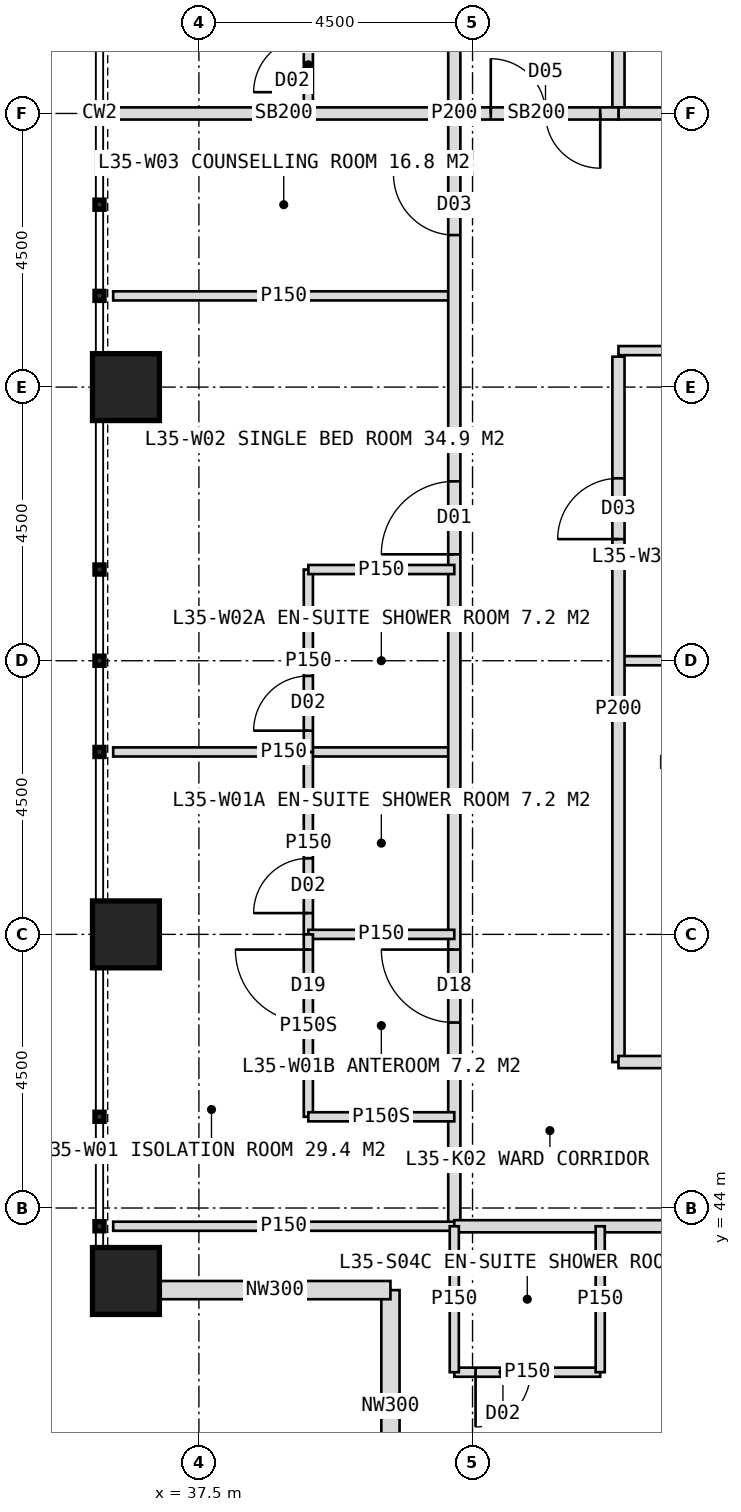
"""IFC4 building model, lengths in metres.
Left out: names, types, materials, properties, quantities, classifications, styles, units other than length and angle.
Written with IfcOpenShell. Run it as: python <this file> out.ifc"""

import sys

from ifc_helpers import new_model, si_unit, direction, frame, frame_2d, origin, origin_2d, place, context, subcontext, project, spatial, rectangle, hollow_rectangle, extrude, element, fill, save


model = new_model("IFC4")
c1 = context("Model", 3, precision=1e-05, world=origin(), true_north=direction((0.0, 1.0)))
c2 = subcontext(c1, "Body", "Model", "MODEL_VIEW")
j1 = project(units=[si_unit("LENGTHUNIT", "METRE"), si_unit("PLANEANGLEUNIT", "RADIAN")], contexts=[c1])
p1 = place(None, origin())
s1 = spatial("IfcSite", under=j1, at=p1, CompositionType="ELEMENT")
p2 = place(p1, origin())
s2 = spatial("IfcBuilding", under=s1, at=p2, CompositionType="ELEMENT")
p3 = place(p2, frame((0.0, 0.0, 148.0)))
s3 = spatial("IfcBuildingStorey", under=s2, at=p3, CompositionType="ELEMENT", Elevation=148.0)
for number, where, z_axis, x_axis in (
    (1, (36.3, 42.8, 0.0), (0.0, 0.0, 1.0), (1.0, 0.0, 0.0)),
    (2, (36.3, 48.5, 0.0), (0.0, 0.0, 1.0), (1.0, 0.0, 0.0)),
    (3, (36.3, 57.5, 0.0), (0.0, 0.0, 1.0), (1.0, 0.0, 0.0)),
):
    element("IfcColumn", number, at=place(p3, frame(where, z_axis=z_axis, x_axis=x_axis)), inside=s3, PredefinedType="COLUMN", context=c2, shape_type="SweptSolid", body=[
        extrude(hollow_rectangle(XDim=1.1, YDim=1.1, WallThickness=0.1, at=origin_2d()), origin(), (0.0, 0.0, 1.0), 4.0),
    ])
for number, where, z_axis, x_axis in (
    (4, (40.65, 38.85, 0.0), (0.0, 0.0, 1.0), (0.0, 1.0, 0.0)),
    (5, (40.65, 42.65, 0.0), (0.0, 0.0, 1.0), (-1.0, 0.0, 0.0)),
):
    element("IfcWall", number, at=place(p3, frame(where, z_axis=z_axis, x_axis=x_axis)), inside=s3, PredefinedType="ELEMENTEDWALL", context=c2, shape_type="SweptSolid", body=[
        extrude(rectangle(XDim=3.8, YDim=0.3, at=frame_2d((1.9, 0.0))), origin(), (0.0, 0.0, 1.0), 4.0),
    ])
for number, where, z_axis, x_axis in (
    (6, (41.7, 51.5, 0.0), (0.0, 0.0, 1.0), (-1.0, 0.0, 0.0)),
    (7, (41.7, 59.0, 0.0), (0.0, 0.0, 1.0), (-1.0, 0.0, 0.0)),
):
    element("IfcWall", number, at=place(p3, frame(where, z_axis=z_axis, x_axis=x_axis)), inside=s3, PredefinedType="PARTITIONING", context=c2, shape_type="SweptSolid", body=[
        extrude(rectangle(XDim=5.61, YDim=0.15, at=frame_2d((2.805, 0.0))), origin(), (0.0, 0.0, 1.0), 3.75),
    ])
p4 = place(p3, frame((41.7, 62.0, 0.0), z_axis=(0.0, 0.0, 1.0), x_axis=(-1.0, 0.0, 0.0)))
e8 = element("IfcWall", 8, at=p4, inside=s3, PredefinedType="SOLIDWALL", context=c2, shape_type="SweptSolid", body=[
    extrude(rectangle(XDim=5.61, YDim=0.2, at=frame_2d((2.805, 0.0))), origin(), (0.0, 0.0, 1.0), 2.95),
])
p5 = place(p3, frame((41.7, 43.7, 0.0), z_axis=(0.0, 0.0, 1.0), x_axis=(0.0, 1.0, 0.0)))
e9 = element("IfcWall", 9, at=p5, inside=s3, PredefinedType="PARTITIONING", context=c2, shape_type="SweptSolid", body=[
    extrude(rectangle(XDim=36.6, YDim=0.2, at=frame_2d((18.3, 0.0))), origin(), (0.0, 0.0, 1.0), 3.75),
])
p6 = place(p5, frame((3.35, 0.0, 0.0)))
e10 = element("IfcOpeningElement", 10, at=p6, cuts=e9, PredefinedType="OPENING", context=c2, shape_type="SweptSolid", body=[
    extrude(rectangle(XDim=1.2, YDim=2.2, at=frame_2d((0.6, 1.1))), frame((0.0, 0.11, 0.0), z_axis=(0.0, -1.0, 0.0), x_axis=(1.0, 0.0, 0.0)), (0.0, 0.0, 1.0), 0.22),
])
p7 = place(p5, frame((11.05, 0.0, 0.0)))
e11 = element("IfcOpeningElement", 11, at=p7, cuts=e9, PredefinedType="OPENING", context=c2, shape_type="SweptSolid", body=[
    extrude(rectangle(XDim=1.2, YDim=2.2, at=frame_2d((0.6, 1.1))), frame((0.0, 0.11, 0.0), z_axis=(0.0, -1.0, 0.0), x_axis=(1.0, 0.0, 0.0)), (0.0, 0.0, 1.0), 0.22),
])
p8 = place(p5, frame((16.3, 0.0, 0.0)))
e12 = element("IfcOpeningElement", 12, at=p8, cuts=e9, PredefinedType="OPENING", context=c2, shape_type="SweptSolid", body=[
    extrude(rectangle(XDim=1.0, YDim=2.1, at=frame_2d((0.5, 1.05))), frame((0.0, 0.11, 0.0), z_axis=(0.0, -1.0, 0.0), x_axis=(1.0, 0.0, 0.0)), (0.0, 0.0, 1.0), 0.22),
])
p9 = place(p5, frame((20.95, 0.0, 0.0)))
e13 = element("IfcOpeningElement", 13, at=p9, cuts=e9, PredefinedType="OPENING", context=c2, shape_type="SweptSolid", body=[
    extrude(rectangle(XDim=1.2, YDim=2.2, at=frame_2d((0.6, 1.1))), frame((0.0, 0.11, 0.0), z_axis=(0.0, -1.0, 0.0), x_axis=(1.0, 0.0, 0.0)), (0.0, 0.0, 1.0), 0.22),
])
p10 = place(p5, frame((32.75, 0.0, 0.0)))
e14 = element("IfcOpeningElement", 14, at=p10, cuts=e9, PredefinedType="OPENING", context=c2, shape_type="SweptSolid", body=[
    extrude(rectangle(XDim=1.2, YDim=2.2, at=frame_2d((0.6, 1.1))), frame((0.0, 0.11, 0.0), z_axis=(0.0, -1.0, 0.0), x_axis=(1.0, 0.0, 0.0)), (0.0, 0.0, 1.0), 0.22),
])
p11 = place(p3, frame((41.7, 43.7, 0.0), z_axis=(0.0, 0.0, 1.0), x_axis=(-1.0, 0.0, 0.0)))
e15 = element("IfcWall", 15, at=p11, inside=s3, PredefinedType="PARTITIONING", context=c2, shape_type="SweptSolid", body=[
    extrude(rectangle(XDim=5.61, YDim=0.15, at=frame_2d((2.805, 0.0))), origin(), (0.0, 0.0, 1.0), 3.75),
])
p12 = place(p3, frame((39.3, 48.5, 0.0), z_axis=(0.0, 0.0, 1.0), x_axis=(0.0, 1.0, 0.0)))
e16 = element("IfcWall", 16, at=p12, inside=s3, PredefinedType="PARTITIONING", context=c2, shape_type="SweptSolid", body=[
    extrude(rectangle(XDim=3.0, YDim=0.15, at=frame_2d((1.5, 0.0))), origin(), (0.0, 0.0, 1.0), 3.75),
])
p13 = place(p12, frame((0.35, 0.0, 0.0)))
e17 = element("IfcOpeningElement", 17, at=p13, cuts=e16, PredefinedType="OPENING", context=c2, shape_type="SweptSolid", body=[
    extrude(rectangle(XDim=0.9, YDim=2.1, at=frame_2d((0.45, 1.05))), frame((0.0, 0.085, 0.0), z_axis=(0.0, -1.0, 0.0), x_axis=(1.0, 0.0, 0.0)), (0.0, 0.0, 1.0), 0.17),
])
p14 = place(p3, frame((41.7, 48.5, 0.0), z_axis=(0.0, 0.0, 1.0), x_axis=(-1.0, 0.0, 0.0)))
e18 = element("IfcWall", 18, at=p14, inside=s3, PredefinedType="PARTITIONING", context=c2, shape_type="SweptSolid", body=[
    extrude(rectangle(XDim=2.4, YDim=0.15, at=frame_2d((1.2, 0.0))), origin(), (0.0, 0.0, 1.0), 2.95),
])
p15 = place(p3, frame((39.3, 45.5, 0.0), z_axis=(0.0, 0.0, 1.0), x_axis=(0.0, 1.0, 0.0)))
e19 = element("IfcWall", 19, at=p15, inside=s3, PredefinedType="PARTITIONING", context=c2, shape_type="SweptSolid", body=[
    extrude(rectangle(XDim=3.0, YDim=0.15, at=frame_2d((1.5, 0.0))), origin(), (0.0, 0.0, 1.0), 3.75),
])
p16 = place(p15, frame((1.55, 0.0, 0.0)))
e20 = element("IfcOpeningElement", 20, at=p16, cuts=e19, PredefinedType="OPENING", context=c2, shape_type="SweptSolid", body=[
    extrude(rectangle(XDim=1.2, YDim=2.2, at=frame_2d((0.6, 1.1))), frame((0.0, 0.085, 0.0), z_axis=(0.0, -1.0, 0.0), x_axis=(1.0, 0.0, 0.0)), (0.0, 0.0, 1.0), 0.17),
])
p17 = place(p3, frame((41.7, 45.5, 0.0), z_axis=(0.0, 0.0, 1.0), x_axis=(-1.0, 0.0, 0.0)))
e21 = element("IfcWall", 21, at=p17, inside=s3, PredefinedType="PARTITIONING", context=c2, shape_type="SweptSolid", body=[
    extrude(rectangle(XDim=2.4, YDim=0.15, at=frame_2d((1.2, 0.0))), origin(), (0.0, 0.0, 1.0), 3.75),
])
p18 = place(p3, frame((39.3, 51.5, 0.0), z_axis=(0.0, 0.0, 1.0), x_axis=(0.0, 1.0, 0.0)))
e22 = element("IfcWall", 22, at=p18, inside=s3, PredefinedType="PARTITIONING", context=c2, shape_type="SweptSolid", body=[
    extrude(rectangle(XDim=3.0, YDim=0.15, at=frame_2d((1.5, 0.0))), origin(), (0.0, 0.0, 1.0), 3.75),
])
p19 = place(p18, frame((0.35, 0.0, 0.0)))
e23 = element("IfcOpeningElement", 23, at=p19, cuts=e22, PredefinedType="OPENING", context=c2, shape_type="SweptSolid", body=[
    extrude(rectangle(XDim=0.9, YDim=2.1, at=frame_2d((0.45, 1.05))), frame((0.0, 0.085, 0.0), z_axis=(0.0, -1.0, 0.0), x_axis=(1.0, 0.0, 0.0)), (0.0, 0.0, 1.0), 0.17),
])
p20 = place(p3, frame((41.7, 54.5, 0.0), z_axis=(0.0, 0.0, 1.0), x_axis=(-1.0, 0.0, 0.0)))
e24 = element("IfcWall", 24, at=p20, inside=s3, PredefinedType="PARTITIONING", context=c2, shape_type="SweptSolid", body=[
    extrude(rectangle(XDim=2.4, YDim=0.15, at=frame_2d((1.2, 0.0))), origin(), (0.0, 0.0, 1.0), 3.75),
])
p21 = place(p3, frame((39.3, 62.0, 0.0), z_axis=(0.0, 0.0, 1.0), x_axis=(0.0, 1.0, 0.0)))
e25 = element("IfcWall", 25, at=p21, inside=s3, PredefinedType="PARTITIONING", context=c2, shape_type="SweptSolid", body=[
    extrude(rectangle(XDim=2.4, YDim=0.15, at=frame_2d((1.2, 0.0))), origin(), (0.0, 0.0, 1.0), 3.75),
])
p22 = place(p21, frame((0.35, 0.0, 0.0)))
e26 = element("IfcOpeningElement", 26, at=p22, cuts=e25, PredefinedType="OPENING", context=c2, shape_type="SweptSolid", body=[
    extrude(rectangle(XDim=0.9, YDim=2.1, at=frame_2d((0.45, 1.05))), frame((0.0, 0.085, 0.0), z_axis=(0.0, -1.0, 0.0), x_axis=(1.0, 0.0, 0.0)), (0.0, 0.0, 1.0), 0.17),
])
p23 = place(p3, frame((51.0, 53.0, 0.0), z_axis=(0.0, 0.0, 1.0), x_axis=(-1.0, 0.0, 0.0)))
e27 = element("IfcWall", 27, at=p23, inside=s3, PredefinedType="PARTITIONING", context=c2, shape_type="SweptSolid", body=[
    extrude(rectangle(XDim=6.6, YDim=0.15, at=frame_2d((3.3, 0.0))), origin(), (0.0, 0.0, 1.0), 3.75),
])
p24 = place(p3, frame((44.4, 46.4, 0.0), z_axis=(0.0, 0.0, 1.0), x_axis=(0.0, 1.0, 0.0)))
e28 = element("IfcWall", 28, at=p24, inside=s3, PredefinedType="PARTITIONING", context=c2, shape_type="SweptSolid", body=[
    extrude(rectangle(XDim=11.6, YDim=0.2, at=frame_2d((5.8, 0.0))), origin(), (0.0, 0.0, 1.0), 3.75),
])
p25 = place(p24, frame((8.6, 0.0, 0.0)))
e29 = element("IfcOpeningElement", 29, at=p25, cuts=e28, PredefinedType="OPENING", context=c2, shape_type="SweptSolid", body=[
    extrude(rectangle(XDim=1.0, YDim=2.1, at=frame_2d((0.5, 1.05))), frame((0.0, 0.11, 0.0), z_axis=(0.0, -1.0, 0.0), x_axis=(1.0, 0.0, 0.0)), (0.0, 0.0, 1.0), 0.22),
])
p26 = place(p3, frame((44.4, 62.0, 0.0), z_axis=(0.0, 0.0, 1.0), x_axis=(0.0, 1.0, 0.0)))
e30 = element("IfcWall", 30, at=p26, inside=s3, PredefinedType="PARTITIONING", context=c2, shape_type="SweptSolid", body=[
    extrude(rectangle(XDim=15.6, YDim=0.2, at=frame_2d((7.8, 0.0))), origin(), (0.0, 0.0, 1.0), 3.75),
])
p27 = place(p26, frame((3.25, 0.0, 0.0)))
e31 = element("IfcOpeningElement", 31, at=p27, cuts=e30, PredefinedType="OPENING", context=c2, shape_type="SweptSolid", body=[
    extrude(rectangle(XDim=1.0, YDim=2.1, at=frame_2d((0.5, 1.05))), frame((0.0, 0.11, 0.0), z_axis=(0.0, -1.0, 0.0), x_axis=(1.0, 0.0, 0.0)), (0.0, 0.0, 1.0), 0.22),
])
p28 = place(p26, frame((9.25, 0.0, 0.0)))
e32 = element("IfcOpeningElement", 32, at=p28, cuts=e30, PredefinedType="OPENING", context=c2, shape_type="SweptSolid", body=[
    extrude(rectangle(XDim=1.0, YDim=2.1, at=frame_2d((0.5, 1.05))), frame((0.0, 0.11, 0.0), z_axis=(0.0, -1.0, 0.0), x_axis=(1.0, 0.0, 0.0)), (0.0, 0.0, 1.0), 0.22),
])
p29 = place(p26, frame((13.3, 0.0, 0.0)))
e33 = element("IfcOpeningElement", 33, at=p29, cuts=e30, PredefinedType="OPENING", context=c2, shape_type="SweptSolid", body=[
    extrude(rectangle(XDim=1.0, YDim=2.1, at=frame_2d((0.5, 1.05))), frame((0.0, 0.11, 0.0), z_axis=(0.0, -1.0, 0.0), x_axis=(1.0, 0.0, 0.0)), (0.0, 0.0, 1.0), 0.22),
])
p30 = place(p3, frame((51.0, 58.1, 0.0), z_axis=(0.0, 0.0, 1.0), x_axis=(-1.0, 0.0, 0.0)))
e34 = element("IfcWall", 34, at=p30, inside=s3, PredefinedType="PARTITIONING", context=c2, shape_type="SweptSolid", body=[
    extrude(rectangle(XDim=6.6, YDim=0.15, at=frame_2d((3.3, 0.0))), origin(), (0.0, 0.0, 1.0), 3.75),
])
p31 = place(p30, frame((0.6, 0.0, 0.0)))
e35 = element("IfcOpeningElement", 35, at=p31, cuts=e34, PredefinedType="OPENING", context=c2, shape_type="SweptSolid", body=[
    extrude(rectangle(XDim=0.9, YDim=2.1, at=frame_2d((0.45, 1.05))), frame((0.0, 0.085, 0.0), z_axis=(0.0, -1.0, 0.0), x_axis=(1.0, 0.0, 0.0)), (0.0, 0.0, 1.0), 0.17),
])
p32 = place(p3, frame((51.0, 62.0, 0.0), z_axis=(0.0, 0.0, 1.0), x_axis=(-1.0, 0.0, 0.0)))
e36 = element("IfcWall", 36, at=p32, inside=s3, PredefinedType="SOLIDWALL", context=c2, shape_type="SweptSolid", body=[
    extrude(rectangle(XDim=6.6, YDim=0.2, at=frame_2d((3.3, 0.0))), origin(), (0.0, 0.0, 1.0), 2.95),
])
p33 = place(p3, frame((78.3, 43.7, 0.0), z_axis=(0.0, 0.0, 1.0), x_axis=(-1.0, 0.0, 0.0)))
e37 = element("IfcWall", 37, at=p33, inside=s3, PredefinedType="PARTITIONING", context=c2, shape_type="SweptSolid", body=[
    extrude(rectangle(XDim=36.6, YDim=0.2, at=frame_2d((18.3, 0.0))), origin(), (0.0, 0.0, 1.0), 3.75),
])
p34 = place(p33, frame((3.35, 0.0, 0.0)))
e38 = element("IfcOpeningElement", 38, at=p34, cuts=e37, PredefinedType="OPENING", context=c2, shape_type="SweptSolid", body=[
    extrude(rectangle(XDim=1.2, YDim=2.2, at=frame_2d((0.6, 1.1))), frame((0.0, 0.11, 0.0), z_axis=(0.0, -1.0, 0.0), x_axis=(1.0, 0.0, 0.0)), (0.0, 0.0, 1.0), 0.22),
])
p35 = place(p33, frame((11.05, 0.0, 0.0)))
e39 = element("IfcOpeningElement", 39, at=p35, cuts=e37, PredefinedType="OPENING", context=c2, shape_type="SweptSolid", body=[
    extrude(rectangle(XDim=1.2, YDim=2.2, at=frame_2d((0.6, 1.1))), frame((0.0, 0.11, 0.0), z_axis=(0.0, -1.0, 0.0), x_axis=(1.0, 0.0, 0.0)), (0.0, 0.0, 1.0), 0.22),
])
p36 = place(p33, frame((19.85, 0.0, 0.0)))
e40 = element("IfcOpeningElement", 40, at=p36, cuts=e37, PredefinedType="OPENING", context=c2, shape_type="SweptSolid", body=[
    extrude(rectangle(XDim=1.2, YDim=2.2, at=frame_2d((0.6, 1.1))), frame((0.0, 0.11, 0.0), z_axis=(0.0, -1.0, 0.0), x_axis=(1.0, 0.0, 0.0)), (0.0, 0.0, 1.0), 0.22),
])
p37 = place(p33, frame((26.95, 0.0, 0.0)))
e41 = element("IfcOpeningElement", 41, at=p37, cuts=e37, PredefinedType="OPENING", context=c2, shape_type="SweptSolid", body=[
    extrude(rectangle(XDim=1.2, YDim=2.2, at=frame_2d((0.6, 1.1))), frame((0.0, 0.11, 0.0), z_axis=(0.0, -1.0, 0.0), x_axis=(1.0, 0.0, 0.0)), (0.0, 0.0, 1.0), 0.22),
])
p38 = place(p3, frame((44.1, 41.3, 0.0), z_axis=(0.0, 0.0, 1.0), x_axis=(-1.0, 0.0, 0.0)))
e42 = element("IfcWall", 42, at=p38, inside=s3, PredefinedType="PARTITIONING", context=c2, shape_type="SweptSolid", body=[
    extrude(rectangle(XDim=2.4, YDim=0.15, at=frame_2d((1.2, 0.0))), origin(), (0.0, 0.0, 1.0), 3.75),
])
p39 = place(p38, frame((1.15, 0.0, 0.0)))
e43 = element("IfcOpeningElement", 43, at=p39, cuts=e42, PredefinedType="OPENING", context=c2, shape_type="SweptSolid", body=[
    extrude(rectangle(XDim=0.9, YDim=2.1, at=frame_2d((0.45, 1.05))), frame((0.0, 0.085, 0.0), z_axis=(0.0, -1.0, 0.0), x_axis=(1.0, 0.0, 0.0)), (0.0, 0.0, 1.0), 0.17),
])
for number, where, z_axis, x_axis in (
    (44, (44.1, 43.7, 0.0), (0.0, 0.0, 1.0), (0.0, -1.0, 0.0)),
    (45, (41.7, 43.7, 0.0), (0.0, 0.0, 1.0), (0.0, -1.0, 0.0)),
):
    element("IfcWall", number, at=place(p3, frame(where, z_axis=z_axis, x_axis=x_axis)), inside=s3, PredefinedType="PARTITIONING", context=c2, shape_type="SweptSolid", body=[
        extrude(rectangle(XDim=2.4, YDim=0.15, at=frame_2d((1.2, 0.0))), origin(), (0.0, 0.0, 1.0), 3.75),
    ])
p40 = place(p3, frame((57.75, 46.4, 0.0), z_axis=(0.0, 0.0, 1.0), x_axis=(-1.0, 0.0, 0.0)))
e46 = element("IfcWall", 46, at=p40, inside=s3, PredefinedType="PARTITIONING", context=c2, shape_type="SweptSolid", body=[
    extrude(rectangle(XDim=13.35, YDim=0.2, at=frame_2d((6.675, 0.0))), origin(), (0.0, 0.0, 1.0), 3.75),
])
p41 = place(p40, frame((1.375, 0.0, 0.0)))
e47 = element("IfcOpeningElement", 47, at=p41, cuts=e46, PredefinedType="OPENING", context=c2, shape_type="SweptSolid", body=[
    extrude(rectangle(XDim=1.0, YDim=2.1, at=frame_2d((0.5, 1.05))), frame((0.0, 0.11, 0.0), z_axis=(0.0, -1.0, 0.0), x_axis=(1.0, 0.0, 0.0)), (0.0, 0.0, 1.0), 0.22),
])
p42 = place(p40, frame((5.5, 0.0, 0.0)))
e48 = element("IfcOpeningElement", 48, at=p42, cuts=e46, PredefinedType="OPENING", context=c2, shape_type="SweptSolid", body=[
    extrude(rectangle(XDim=1.0, YDim=2.1, at=frame_2d((0.5, 1.05))), frame((0.0, 0.11, 0.0), z_axis=(0.0, -1.0, 0.0), x_axis=(1.0, 0.0, 0.0)), (0.0, 0.0, 1.0), 0.22),
])
p43 = place(p40, frame((10.3, 0.0, 0.0)))
e49 = element("IfcOpeningElement", 49, at=p43, cuts=e46, PredefinedType="OPENING", context=c2, shape_type="SweptSolid", body=[
    extrude(rectangle(XDim=1.0, YDim=2.1, at=frame_2d((0.5, 1.05))), frame((0.0, 0.11, 0.0), z_axis=(0.0, -1.0, 0.0), x_axis=(1.0, 0.0, 0.0)), (0.0, 0.0, 1.0), 0.22),
])
p44 = place(p3, frame((44.4, 62.0, 0.0), z_axis=(0.0, 0.0, 1.0), x_axis=(-1.0, 0.0, 0.0)))
e50 = element("IfcWall", 50, at=p44, inside=s3, PredefinedType="SOLIDWALL", context=c2, shape_type="SweptSolid", body=[
    extrude(rectangle(XDim=2.7, YDim=0.2, at=frame_2d((1.35, 0.0))), origin(), (0.0, 0.0, 1.0), 2.95),
])
p45 = place(p44, frame((0.3, 0.0, 0.0)))
e51 = element("IfcOpeningElement", 51, at=p45, cuts=e50, PredefinedType="OPENING", context=c2, shape_type="SweptSolid", body=[
    extrude(rectangle(XDim=1.8, YDim=2.2, at=frame_2d((0.9, 1.1))), frame((0.0, 0.11, 0.0), z_axis=(0.0, -1.0, 0.0), x_axis=(1.0, 0.0, 0.0)), (0.0, 0.0, 1.0), 0.22),
])
p46 = place(p16, origin())
e52 = element("IfcDoor", 52, at=p46, inside=s3, OperationType="SINGLE_SWING_RIGHT", PredefinedType="DOOR", context=c2, shape_type="SweptSolid", body=[
    extrude(rectangle(XDim=1.2, YDim=2.2, at=frame_2d((0.6, 1.1))), frame((0.0, 0.025, 0.0), z_axis=(0.0, -1.0, 0.0), x_axis=(1.0, 0.0, 0.0)), (0.0, 0.0, 1.0), 0.05),
])
fill(e20, e52)
p47 = place(p6, origin())
e53 = element("IfcDoor", 53, at=p47, inside=s3, OperationType="SINGLE_SWING_RIGHT", PredefinedType="DOOR", context=c2, shape_type="SweptSolid", body=[
    extrude(rectangle(XDim=1.2, YDim=2.2, at=frame_2d((0.6, 1.1))), frame((0.0, 0.025, 0.0), z_axis=(0.0, -1.0, 0.0), x_axis=(1.0, 0.0, 0.0)), (0.0, 0.0, 1.0), 0.05),
])
fill(e10, e53)
p48 = place(p13, origin())
e54 = element("IfcDoor", 54, at=p48, inside=s3, OperationType="SINGLE_SWING_LEFT", PredefinedType="DOOR", context=c2, shape_type="SweptSolid", body=[
    extrude(rectangle(XDim=0.9, YDim=2.1, at=frame_2d((0.45, 1.05))), frame((0.0, 0.025, 0.0), z_axis=(0.0, -1.0, 0.0), x_axis=(1.0, 0.0, 0.0)), (0.0, 0.0, 1.0), 0.05),
])
fill(e17, e54)
p49 = place(p7, origin())
e55 = element("IfcDoor", 55, at=p49, inside=s3, OperationType="SINGLE_SWING_LEFT", PredefinedType="DOOR", context=c2, shape_type="SweptSolid", body=[
    extrude(rectangle(XDim=1.2, YDim=2.2, at=frame_2d((0.6, 1.1))), frame((0.0, 0.025, 0.0), z_axis=(0.0, -1.0, 0.0), x_axis=(1.0, 0.0, 0.0)), (0.0, 0.0, 1.0), 0.05),
])
fill(e11, e55)
p50 = place(p19, origin())
e56 = element("IfcDoor", 56, at=p50, inside=s3, OperationType="SINGLE_SWING_LEFT", PredefinedType="DOOR", context=c2, shape_type="SweptSolid", body=[
    extrude(rectangle(XDim=0.9, YDim=2.1, at=frame_2d((0.45, 1.05))), frame((0.0, 0.025, 0.0), z_axis=(0.0, -1.0, 0.0), x_axis=(1.0, 0.0, 0.0)), (0.0, 0.0, 1.0), 0.05),
])
fill(e23, e56)
p51 = place(p8, origin())
e57 = element("IfcDoor", 57, at=p51, inside=s3, OperationType="SINGLE_SWING_RIGHT", PredefinedType="DOOR", context=c2, shape_type="SweptSolid", body=[
    extrude(rectangle(XDim=1.0, YDim=2.1, at=frame_2d((0.5, 1.05))), frame((0.0, 0.025, 0.0), z_axis=(0.0, -1.0, 0.0), x_axis=(1.0, 0.0, 0.0)), (0.0, 0.0, 1.0), 0.05),
])
fill(e12, e57)
p52 = place(p22, origin())
e58 = element("IfcDoor", 58, at=p52, inside=s3, OperationType="SINGLE_SWING_LEFT", PredefinedType="DOOR", context=c2, shape_type="SweptSolid", body=[
    extrude(rectangle(XDim=0.9, YDim=2.1, at=frame_2d((0.45, 1.05))), frame((0.0, 0.025, 0.0), z_axis=(0.0, -1.0, 0.0), x_axis=(1.0, 0.0, 0.0)), (0.0, 0.0, 1.0), 0.05),
])
fill(e26, e58)
p53 = place(p25, origin())
e59 = element("IfcDoor", 59, at=p53, inside=s3, OperationType="SINGLE_SWING_LEFT", PredefinedType="DOOR", context=c2, shape_type="SweptSolid", body=[
    extrude(rectangle(XDim=1.0, YDim=2.1, at=frame_2d((0.5, 1.05))), frame((0.0, 0.025, 0.0), z_axis=(0.0, -1.0, 0.0), x_axis=(1.0, 0.0, 0.0)), (0.0, 0.0, 1.0), 0.05),
])
fill(e29, e59)
p54 = place(p39, origin())
e60 = element("IfcDoor", 60, at=p54, inside=s3, OperationType="SINGLE_SWING_RIGHT", PredefinedType="DOOR", context=c2, shape_type="SweptSolid", body=[
    extrude(rectangle(XDim=0.9, YDim=2.1, at=frame_2d((0.45, 1.05))), frame((0.0, 0.025, 0.0), z_axis=(0.0, -1.0, 0.0), x_axis=(1.0, 0.0, 0.0)), (0.0, 0.0, 1.0), 0.05),
])
fill(e43, e60)
p55 = place(p45, origin())
e61 = element("IfcDoor", 61, at=p55, inside=s3, OperationType="DOUBLE_DOOR_DOUBLE_SWING", PredefinedType="DOOR", context=c2, shape_type="SweptSolid", body=[
    extrude(rectangle(XDim=1.8, YDim=2.2, at=frame_2d((0.9, 1.1))), frame((0.0, 0.025, 0.0), z_axis=(0.0, -1.0, 0.0), x_axis=(1.0, 0.0, 0.0)), (0.0, 0.0, 1.0), 0.05),
])
fill(e51, e61)
save(model, sys.argv[1])
